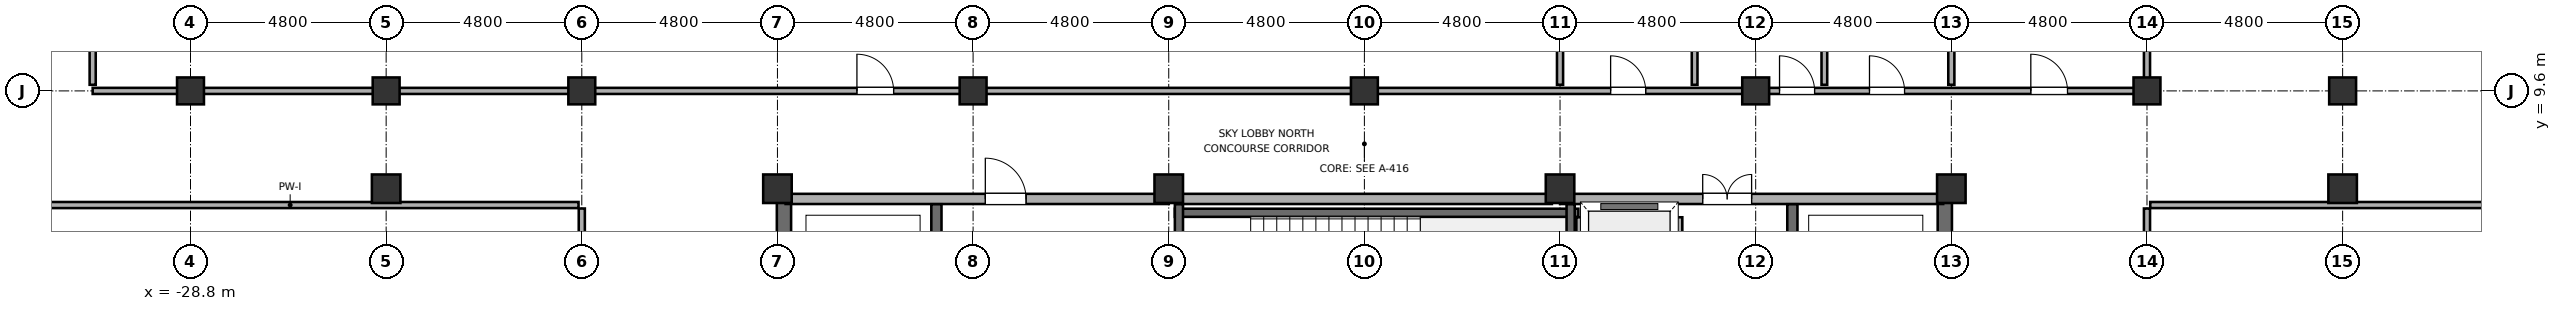
"""IFC4 building model, lengths in metres.
Left out: names, types, materials, properties, quantities, classifications, styles, units other than length and angle.
Written with IfcOpenShell. Run it as: python <this file> out.ifc"""

import sys

from ifc_helpers import new_model, si_unit, direction, frame, frame_2d, origin, origin_2d, place, context, subcontext, project, spatial, rectangle, hollow_rectangle, hollow_circle, extrude, element, fill, save


model = new_model("IFC4")
c1 = context("Model", 3, precision=1e-05, world=origin(), true_north=direction((0.0, 1.0)))
c2 = subcontext(c1, "Body", "Model", "MODEL_VIEW")
j1 = project(units=[si_unit("LENGTHUNIT", "METRE"), si_unit("PLANEANGLEUNIT", "RADIAN")], contexts=[c1])
p1 = place(None, origin())
s1 = spatial("IfcSite", under=j1, at=p1, CompositionType="ELEMENT")
p2 = place(p1, origin())
s2 = spatial("IfcBuilding", under=s1, at=p2, CompositionType="ELEMENT")
p3 = place(p2, frame((0.0, 0.0, 180.3)))
s3 = spatial("IfcBuildingStorey", under=s2, at=p3, CompositionType="ELEMENT", Elevation=180.3)
p4 = place(p3, frame((-28.8, 9.6, 0.0), z_axis=(0.0, 0.0, 1.0), x_axis=(1.0, 0.0, 0.0)))
e1 = element("IfcColumn", 1, at=p4, inside=s3, PredefinedType="COLUMN", context=c2, shape_type="SweptSolid", body=[
    extrude(hollow_circle(Radius=0.33, WallThickness=0.028, at=origin_2d()), origin(), (0.0, 0.0, 1.0), 5.2),
])
p5 = place(p3, frame((-24.0, 7.2, 0.0), z_axis=(0.0, 0.0, 1.0), x_axis=(1.0, 0.0, 0.0)))
e2 = element("IfcColumn", 2, at=p5, inside=s3, PredefinedType="COLUMN", context=c2, shape_type="SweptSolid", body=[
    extrude(hollow_rectangle(XDim=0.7, YDim=0.7, WallThickness=0.032, at=origin_2d()), origin(), (0.0, 0.0, 1.0), 5.2),
])
for number, where, z_axis, x_axis in (
    (3, (-24.0, 9.6, 0.0), (0.0, 0.0, 1.0), (1.0, 0.0, 0.0)),
    (4, (-19.2, 9.6, 0.0), (0.0, 0.0, 1.0), (1.0, 0.0, 0.0)),
):
    element("IfcColumn", number, at=place(p3, frame(where, z_axis=z_axis, x_axis=x_axis)), inside=s3, PredefinedType="COLUMN", context=c2, shape_type="SweptSolid", body=[
        extrude(hollow_circle(Radius=0.33, WallThickness=0.028, at=origin_2d()), origin(), (0.0, 0.0, 1.0), 5.2),
    ])
p6 = place(p3, frame((-14.4, 7.2, 0.0), z_axis=(0.0, 0.0, 1.0), x_axis=(1.0, 0.0, 0.0)))
e5 = element("IfcColumn", 5, at=p6, inside=s3, PredefinedType="COLUMN", context=c2, shape_type="SweptSolid", body=[
    extrude(hollow_rectangle(XDim=0.7, YDim=0.7, WallThickness=0.032, at=origin_2d()), origin(), (0.0, 0.0, 1.0), 5.2),
])
p7 = place(p3, frame((-9.6, 9.6, 0.0), z_axis=(0.0, 0.0, 1.0), x_axis=(1.0, 0.0, 0.0)))
e6 = element("IfcColumn", 6, at=p7, inside=s3, PredefinedType="COLUMN", context=c2, shape_type="SweptSolid", body=[
    extrude(hollow_circle(Radius=0.33, WallThickness=0.028, at=origin_2d()), origin(), (0.0, 0.0, 1.0), 5.2),
])
p8 = place(p3, frame((-4.8, 7.2, 0.0), z_axis=(0.0, 0.0, 1.0), x_axis=(1.0, 0.0, 0.0)))
e7 = element("IfcColumn", 7, at=p8, inside=s3, PredefinedType="COLUMN", context=c2, shape_type="SweptSolid", body=[
    extrude(hollow_rectangle(XDim=0.7, YDim=0.7, WallThickness=0.032, at=origin_2d()), origin(), (0.0, 0.0, 1.0), 5.2),
])
p9 = place(p3, frame((0.0, 9.6, 0.0), z_axis=(0.0, 0.0, 1.0), x_axis=(1.0, 0.0, 0.0)))
e8 = element("IfcColumn", 8, at=p9, inside=s3, PredefinedType="COLUMN", context=c2, shape_type="SweptSolid", body=[
    extrude(hollow_circle(Radius=0.33, WallThickness=0.028, at=origin_2d()), origin(), (0.0, 0.0, 1.0), 5.2),
])
p10 = place(p3, frame((4.8, 7.2, 0.0), z_axis=(0.0, 0.0, 1.0), x_axis=(1.0, 0.0, 0.0)))
e9 = element("IfcColumn", 9, at=p10, inside=s3, PredefinedType="COLUMN", context=c2, shape_type="SweptSolid", body=[
    extrude(hollow_rectangle(XDim=0.7, YDim=0.7, WallThickness=0.032, at=origin_2d()), origin(), (0.0, 0.0, 1.0), 5.2),
])
p11 = place(p3, frame((9.6, 9.6, 0.0), z_axis=(0.0, 0.0, 1.0), x_axis=(1.0, 0.0, 0.0)))
e10 = element("IfcColumn", 10, at=p11, inside=s3, PredefinedType="COLUMN", context=c2, shape_type="SweptSolid", body=[
    extrude(hollow_circle(Radius=0.33, WallThickness=0.028, at=origin_2d()), origin(), (0.0, 0.0, 1.0), 5.2),
])
p12 = place(p3, frame((14.4, 7.2, 0.0), z_axis=(0.0, 0.0, 1.0), x_axis=(1.0, 0.0, 0.0)))
e11 = element("IfcColumn", 11, at=p12, inside=s3, PredefinedType="COLUMN", context=c2, shape_type="SweptSolid", body=[
    extrude(hollow_rectangle(XDim=0.7, YDim=0.7, WallThickness=0.032, at=origin_2d()), origin(), (0.0, 0.0, 1.0), 5.2),
])
p13 = place(p3, frame((19.2, 9.6, 0.0), z_axis=(0.0, 0.0, 1.0), x_axis=(1.0, 0.0, 0.0)))
e12 = element("IfcColumn", 12, at=p13, inside=s3, PredefinedType="COLUMN", context=c2, shape_type="SweptSolid", body=[
    extrude(hollow_circle(Radius=0.33, WallThickness=0.028, at=origin_2d()), origin(), (0.0, 0.0, 1.0), 5.2),
])
p14 = place(p3, frame((24.0, 7.2, 0.0), z_axis=(0.0, 0.0, 1.0), x_axis=(1.0, 0.0, 0.0)))
e13 = element("IfcColumn", 13, at=p14, inside=s3, PredefinedType="COLUMN", context=c2, shape_type="SweptSolid", body=[
    extrude(hollow_rectangle(XDim=0.7, YDim=0.7, WallThickness=0.032, at=origin_2d()), origin(), (0.0, 0.0, 1.0), 5.2),
])
p15 = place(p3, frame((24.0, 9.6, 0.0), z_axis=(0.0, 0.0, 1.0), x_axis=(1.0, 0.0, 0.0)))
e14 = element("IfcColumn", 14, at=p15, inside=s3, PredefinedType="COLUMN", context=c2, shape_type="SweptSolid", body=[
    extrude(hollow_circle(Radius=0.33, WallThickness=0.028, at=origin_2d()), origin(), (0.0, 0.0, 1.0), 5.2),
])
for number, where, z_axis, x_axis in (
    (15, (-14.24, -7.2, -0.22), (0.0, 0.0, 1.0), (0.0, 1.0, 0.0)),
    (16, (14.24, -7.2, -0.22), (0.0, 0.0, 1.0), (0.0, 1.0, 0.0)),
):
    element("IfcWall", number, at=place(p3, frame(where, z_axis=z_axis, x_axis=x_axis)), inside=s3, PredefinedType="SHEAR", context=c2, shape_type="SweptSolid", body=[
        extrude(rectangle(XDim=14.4, YDim=0.35, at=frame_2d((7.2, 0.0))), origin(), (0.0, 0.0, 1.0), 5.17),
    ])
p16 = place(p3, frame((-14.2, 6.95, 0.0), z_axis=(0.0, 0.0, 1.0), x_axis=(1.0, 0.0, 0.0)))
e17 = element("IfcWall", 17, at=p16, inside=s3, PredefinedType="SOLIDWALL", context=c2, shape_type="SweptSolid", body=[
    extrude(rectangle(XDim=9.4, YDim=0.25, at=frame_2d((4.7, 0.0))), origin(), (0.0, 0.0, 1.0), 3.55),
])
p17 = place(p16, frame((4.9, 0.0, 0.0)))
e18 = element("IfcOpeningElement", 18, at=p17, cuts=e17, PredefinedType="OPENING", context=c2, shape_type="SweptSolid", body=[
    extrude(rectangle(XDim=1.0, YDim=2.15, at=frame_2d((0.5, 1.075))), frame((0.0, 0.14, 0.0), z_axis=(0.0, -1.0, 0.0), x_axis=(1.0, 0.0, 0.0)), (0.0, 0.0, 1.0), 0.28),
])
p18 = place(p3, frame((-4.6, 6.95, 0.0), z_axis=(0.0, 0.0, 1.0), x_axis=(1.0, 0.0, 0.0)))
e19 = element("IfcWall", 19, at=p18, inside=s3, PredefinedType="SOLIDWALL", context=c2, shape_type="SweptSolid", body=[
    extrude(rectangle(XDim=9.2, YDim=0.25, at=frame_2d((4.6, 0.0))), origin(), (0.0, 0.0, 1.0), 3.55),
])
p19 = place(p3, frame((4.8, 6.95, 0.0), z_axis=(0.0, 0.0, 1.0), x_axis=(1.0, 0.0, 0.0)))
e20 = element("IfcWall", 20, at=p19, inside=s3, PredefinedType="SOLIDWALL", context=c2, shape_type="SweptSolid", body=[
    extrude(rectangle(XDim=9.4, YDim=0.25, at=frame_2d((4.7, 0.0))), origin(), (0.0, 0.0, 1.0), 3.55),
])
p20 = place(p19, frame((3.5, 0.0, 0.0)))
e21 = element("IfcOpeningElement", 21, at=p20, cuts=e20, PredefinedType="OPENING", context=c2, shape_type="SweptSolid", body=[
    extrude(rectangle(XDim=1.2, YDim=2.2, at=frame_2d((0.6, 1.1))), frame((0.0, 0.14, 0.0), z_axis=(0.0, -1.0, 0.0), x_axis=(1.0, 0.0, 0.0)), (0.0, 0.0, 1.0), 0.28),
])
p21 = place(p3, frame((-10.5, -6.82, -0.22), z_axis=(0.0, 0.0, 1.0), x_axis=(0.0, 1.0, 0.0)))
e22 = element("IfcWall", 22, at=p21, inside=s3, PredefinedType="SOLIDWALL", context=c2, shape_type="SweptSolid", body=[
    extrude(rectangle(XDim=13.64, YDim=0.25, at=frame_2d((6.82, 0.0))), origin(), (0.0, 0.0, 1.0), 5.17),
])
p22 = place(p21, frame((2.32, 0.0, 0.22)))
e23 = element("IfcOpeningElement", 23, at=p22, cuts=e22, PredefinedType="OPENING", context=c2, shape_type="SweptSolid", body=[
    extrude(rectangle(XDim=0.95, YDim=2.15, at=frame_2d((0.475, 1.075))), frame((0.0, 0.14, 0.0), z_axis=(0.0, -1.0, 0.0), x_axis=(1.0, 0.0, 0.0)), (0.0, 0.0, 1.0), 0.28),
])
p23 = place(p3, frame((10.5, -6.82, -0.22), z_axis=(0.0, 0.0, 1.0), x_axis=(0.0, 1.0, 0.0)))
e24 = element("IfcWall", 24, at=p23, inside=s3, PredefinedType="SOLIDWALL", context=c2, shape_type="SweptSolid", body=[
    extrude(rectangle(XDim=13.64, YDim=0.25, at=frame_2d((6.82, 0.0))), origin(), (0.0, 0.0, 1.0), 5.17),
])
p24 = place(p23, frame((2.32, 0.0, 0.22)))
e25 = element("IfcOpeningElement", 25, at=p24, cuts=e24, PredefinedType="OPENING", context=c2, shape_type="SweptSolid", body=[
    extrude(rectangle(XDim=0.95, YDim=2.15, at=frame_2d((0.475, 1.075))), frame((0.0, 0.14, 0.0), z_axis=(0.0, -1.0, 0.0), x_axis=(1.0, 0.0, 0.0)), (0.0, 0.0, 1.0), 0.28),
])
p25 = place(p3, frame((-4.65, 6.61, -0.22), z_axis=(0.0, 0.0, 1.0), x_axis=(1.0, 0.0, 0.0)))
e26 = element("IfcWall", 26, at=p25, inside=s3, PredefinedType="SOLIDWALL", context=c2, shape_type="SweptSolid", body=[
    extrude(rectangle(XDim=9.9, YDim=0.2, at=frame_2d((4.95, 0.0))), origin(), (0.0, 0.0, 1.0), 5.17),
])
for number, where, z_axis, x_axis in (
    (27, (-4.55, 3.08, -0.22), (0.0, 0.0, 1.0), (0.0, 1.0, 0.0)),
    (28, (5.06, 3.08, -0.22), (0.0, 0.0, 1.0), (0.0, 1.0, 0.0)),
):
    element("IfcWall", number, at=place(p3, frame(where, z_axis=z_axis, x_axis=x_axis)), inside=s3, PredefinedType="SOLIDWALL", context=c2, shape_type="SweptSolid", body=[
        extrude(rectangle(XDim=3.74, YDim=0.2, at=frame_2d((1.87, 0.0))), origin(), (0.0, 0.0, 1.0), 5.17),
    ])
p26 = place(p3, frame((7.7, -0.3, 0.0), z_axis=(0.0, 0.0, 1.0), x_axis=(0.0, 1.0, 0.0)))
e29 = element("IfcWall", 29, at=p26, inside=s3, PredefinedType="SOLIDWALL", context=c2, shape_type="SweptSolid", body=[
    extrude(rectangle(XDim=6.8, YDim=0.2, at=frame_2d((3.4, 0.0))), origin(), (0.0, 0.0, 1.0), 4.95),
])
p27 = place(p26, frame((0.55, 0.0, 0.0)))
e30 = element("IfcOpeningElement", 30, at=p27, cuts=e29, PredefinedType="OPENING", context=c2, shape_type="SweptSolid", body=[
    extrude(rectangle(XDim=1.1, YDim=2.2, at=frame_2d((0.55, 1.1))), frame((0.0, 0.115, 0.0), z_axis=(0.0, -1.0, 0.0), x_axis=(1.0, 0.0, 0.0)), (0.0, 0.0, 1.0), 0.23),
])
p28 = place(p26, frame((2.9, 0.0, 0.0)))
e31 = element("IfcOpeningElement", 31, at=p28, cuts=e29, PredefinedType="OPENING", context=c2, shape_type="SweptSolid", body=[
    extrude(rectangle(XDim=1.1, YDim=2.2, at=frame_2d((0.55, 1.1))), frame((0.0, 0.115, 0.0), z_axis=(0.0, -1.0, 0.0), x_axis=(1.0, 0.0, 0.0)), (0.0, 0.0, 1.0), 0.23),
])
p29 = place(p26, frame((5.2, 0.0, 0.0)))
e32 = element("IfcOpeningElement", 32, at=p29, cuts=e29, PredefinedType="OPENING", context=c2, shape_type="SweptSolid", body=[
    extrude(rectangle(XDim=1.1, YDim=2.2, at=frame_2d((0.55, 1.1))), frame((0.0, 0.115, 0.0), z_axis=(0.0, -1.0, 0.0), x_axis=(1.0, 0.0, 0.0)), (0.0, 0.0, 1.0), 0.23),
])
p30 = place(p3, frame((5.3, -0.3, 0.0), z_axis=(0.0, 0.0, 1.0), x_axis=(0.0, 1.0, 0.0)))
e33 = element("IfcWall", 33, at=p30, inside=s3, PredefinedType="SOLIDWALL", context=c2, shape_type="SweptSolid", body=[
    extrude(rectangle(XDim=6.8, YDim=0.2, at=frame_2d((3.4, 0.0))), origin(), (0.0, 0.0, 1.0), 4.95),
])
p31 = place(p3, frame((5.44, 6.5, 0.0), z_axis=(0.0, 0.0, 1.0), x_axis=(1.0, 0.0, 0.0)))
e34 = element("IfcWall", 34, at=p31, inside=s3, PredefinedType="PARTITIONING", context=c2, shape_type="SweptSolid", body=[
    extrude(rectangle(XDim=2.12, YDim=0.12, at=frame_2d((1.06, 0.0))), origin(), (0.0, 0.0, 1.0), 4.95),
])
p32 = place(p3, frame((-33.43, 6.8, 0.0), z_axis=(0.0, 0.0, 1.0), x_axis=(1.0, 0.0, 0.0)))
e35 = element("IfcWall", 35, at=p32, inside=s3, PredefinedType="PARTITIONING", context=c2, shape_type="SweptSolid", body=[
    extrude(rectangle(XDim=14.15, YDim=0.15, at=frame_2d((7.075, 0.0))), origin(), (0.0, 0.0, 1.0), 3.55),
])
p33 = place(p3, frame((19.28, 6.8, 0.0), z_axis=(0.0, 0.0, 1.0), x_axis=(1.0, 0.0, 0.0)))
e36 = element("IfcWall", 36, at=p33, inside=s3, PredefinedType="PARTITIONING", context=c2, shape_type="SweptSolid", body=[
    extrude(rectangle(XDim=9.35, YDim=0.15, at=frame_2d((4.675, 0.0))), origin(), (0.0, 0.0, 1.0), 3.55),
])
p34 = place(p3, frame((-31.2, 9.6, 0.0), z_axis=(0.0, 0.0, 1.0), x_axis=(1.0, 0.0, 0.0)))
e37 = element("IfcWall", 37, at=p34, inside=s3, PredefinedType="PARTITIONING", context=c2, shape_type="SweptSolid", body=[
    extrude(rectangle(XDim=50.28, YDim=0.15, at=frame_2d((25.14, 0.0))), origin(), (0.0, 0.0, 1.0), 3.55),
])
p35 = place(p34, frame((18.75, 0.0, 0.0)))
e38 = element("IfcOpeningElement", 38, at=p35, cuts=e37, PredefinedType="OPENING", context=c2, shape_type="SweptSolid", body=[
    extrude(rectangle(XDim=0.9, YDim=2.1, at=frame_2d((0.45, 1.05))), frame((0.0, 0.09, 0.0), z_axis=(0.0, -1.0, 0.0), x_axis=(1.0, 0.0, 0.0)), (0.0, 0.0, 1.0), 0.18),
])
p36 = place(p34, frame((37.241, 0.0, 0.0)))
e39 = element("IfcOpeningElement", 39, at=p36, cuts=e37, PredefinedType="OPENING", context=c2, shape_type="SweptSolid", body=[
    extrude(rectangle(XDim=0.86, YDim=2.1, at=frame_2d((0.43, 1.05))), frame((0.0, 0.09, 0.0), z_axis=(0.0, -1.0, 0.0), x_axis=(1.0, 0.0, 0.0)), (0.0, 0.0, 1.0), 0.18),
])
p37 = place(p34, frame((41.385, 0.0, 0.0)))
e40 = element("IfcOpeningElement", 40, at=p37, cuts=e37, PredefinedType="OPENING", context=c2, shape_type="SweptSolid", body=[
    extrude(rectangle(XDim=0.86, YDim=2.1, at=frame_2d((0.43, 1.05))), frame((0.0, 0.09, 0.0), z_axis=(0.0, -1.0, 0.0), x_axis=(1.0, 0.0, 0.0)), (0.0, 0.0, 1.0), 0.18),
])
p38 = place(p34, frame((43.592, 0.0, 0.0)))
e41 = element("IfcOpeningElement", 41, at=p38, cuts=e37, PredefinedType="OPENING", context=c2, shape_type="SweptSolid", body=[
    extrude(rectangle(XDim=0.86, YDim=2.1, at=frame_2d((0.43, 1.05))), frame((0.0, 0.09, 0.0), z_axis=(0.0, -1.0, 0.0), x_axis=(1.0, 0.0, 0.0)), (0.0, 0.0, 1.0), 0.18),
])
p39 = place(p34, frame((47.55, 0.0, 0.0)))
e42 = element("IfcOpeningElement", 42, at=p39, cuts=e37, PredefinedType="OPENING", context=c2, shape_type="SweptSolid", body=[
    extrude(rectangle(XDim=0.9, YDim=2.1, at=frame_2d((0.45, 1.05))), frame((0.0, 0.09, 0.0), z_axis=(0.0, -1.0, 0.0), x_axis=(1.0, 0.0, 0.0)), (0.0, 0.0, 1.0), 0.18),
])
p40 = place(p3, frame((-31.2, 9.75, 0.0), z_axis=(0.0, 0.0, 1.0), x_axis=(0.0, 1.0, 0.0)))
e43 = element("IfcWall", 43, at=p40, inside=s3, PredefinedType="PARTITIONING", context=c2, shape_type="SweptSolid", body=[
    extrude(rectangle(XDim=8.689, YDim=0.15, at=frame_2d((4.344, 0.0))), origin(), (0.0, 0.0, 1.0), 3.55),
])
p41 = place(p3, frame((-19.2, -6.715, 0.0), z_axis=(0.0, 0.0, 1.0), x_axis=(0.0, 1.0, 0.0)))
e44 = element("IfcWall", 44, at=p41, inside=s3, PredefinedType="PARTITIONING", context=c2, shape_type="SweptSolid", body=[
    extrude(rectangle(XDim=13.43, YDim=0.15, at=frame_2d((6.715, 0.0))), origin(), (0.0, 0.0, 1.0), 3.55),
])
p42 = place(p41, frame((8.413, 0.0, 0.0)))
e45 = element("IfcOpeningElement", 45, at=p42, cuts=e44, PredefinedType="OPENING", context=c2, shape_type="SweptSolid", body=[
    extrude(rectangle(XDim=0.9, YDim=2.1, at=frame_2d((0.45, 1.05))), frame((0.0, 0.09, 0.0), z_axis=(0.0, -1.0, 0.0), x_axis=(1.0, 0.0, 0.0)), (0.0, 0.0, 1.0), 0.18),
])
p43 = place(p3, frame((4.8, 9.75, 0.0), z_axis=(0.0, 0.0, 1.0), x_axis=(0.0, 1.0, 0.0)))
e46 = element("IfcWall", 46, at=p43, inside=s3, PredefinedType="PARTITIONING", context=c2, shape_type="SweptSolid", body=[
    extrude(rectangle(XDim=9.16, YDim=0.15, at=frame_2d((4.58, 0.0))), origin(), (0.0, 0.0, 1.0), 3.55),
])
for number, where, z_axis, x_axis in (
    (47, (8.102, 9.75, 0.0), (0.0, 0.0, 1.0), (0.0, 1.0, 0.0)),
    (48, (11.285, 9.75, 0.0), (0.0, 0.0, 1.0), (0.0, 1.0, 0.0)),
):
    element("IfcWall", number, at=place(p3, frame(where, z_axis=z_axis, x_axis=x_axis)), inside=s3, PredefinedType="PLUMBINGWALL", context=c2, shape_type="SweptSolid", body=[
        extrude(rectangle(XDim=4.53, YDim=0.14, at=frame_2d((2.265, 0.0))), origin(), (0.0, 0.0, 1.0), 3.55),
    ])
p44 = place(p3, frame((14.4, 9.75, 0.0), z_axis=(0.0, 0.0, 1.0), x_axis=(0.0, 1.0, 0.0)))
e49 = element("IfcWall", 49, at=p44, inside=s3, PredefinedType="PARTITIONING", context=c2, shape_type="SweptSolid", body=[
    extrude(rectangle(XDim=4.53, YDim=0.15, at=frame_2d((2.265, 0.0))), origin(), (0.0, 0.0, 1.0), 3.55),
])
p45 = place(p3, frame((19.2, -6.715, 0.0), z_axis=(0.0, 0.0, 1.0), x_axis=(0.0, 1.0, 0.0)))
e50 = element("IfcWall", 50, at=p45, inside=s3, PredefinedType="PARTITIONING", context=c2, shape_type="SweptSolid", body=[
    extrude(rectangle(XDim=13.43, YDim=0.15, at=frame_2d((6.715, 0.0))), origin(), (0.0, 0.0, 1.0), 3.55),
])
p46 = place(p45, frame((8.413, 0.0, 0.0)))
e51 = element("IfcOpeningElement", 51, at=p46, cuts=e50, PredefinedType="OPENING", context=c2, shape_type="SweptSolid", body=[
    extrude(rectangle(XDim=0.9, YDim=2.1, at=frame_2d((0.45, 1.05))), frame((0.0, 0.09, 0.0), z_axis=(0.0, -1.0, 0.0), x_axis=(1.0, 0.0, 0.0)), (0.0, 0.0, 1.0), 0.18),
])
p47 = place(p3, frame((19.2, 9.75, 0.0), z_axis=(0.0, 0.0, 1.0), x_axis=(0.0, 1.0, 0.0)))
e52 = element("IfcWall", 52, at=p47, inside=s3, PredefinedType="PARTITIONING", context=c2, shape_type="SweptSolid", body=[
    extrude(rectangle(XDim=4.53, YDim=0.15, at=frame_2d((2.265, 0.0))), origin(), (0.0, 0.0, 1.0), 3.55),
])
p48 = place(p17, origin())
e53 = element("IfcDoor", 53, at=p48, inside=s3, OperationType="SINGLE_SWING_RIGHT", PredefinedType="DOOR", context=c2, shape_type="SweptSolid", body=[
    extrude(rectangle(XDim=1.0, YDim=2.15, at=frame_2d((0.5, 1.075))), frame((0.0, 0.025, 0.0), z_axis=(0.0, -1.0, 0.0), x_axis=(1.0, 0.0, 0.0)), (0.0, 0.0, 1.0), 0.05),
])
fill(e18, e53)
p49 = place(p20, origin())
e54 = element("IfcDoor", 54, at=p49, inside=s3, OperationType="DOUBLE_DOOR_SINGLE_SWING", PredefinedType="DOOR", context=c2, shape_type="SweptSolid", body=[
    extrude(rectangle(XDim=1.2, YDim=2.2, at=frame_2d((0.6, 1.1))), frame((0.0, 0.025, 0.0), z_axis=(0.0, -1.0, 0.0), x_axis=(1.0, 0.0, 0.0)), (0.0, 0.0, 1.0), 0.05),
])
fill(e21, e54)
p50 = place(p35, origin())
e55 = element("IfcDoor", 55, at=p50, inside=s3, OperationType="SINGLE_SWING_RIGHT", PredefinedType="DOOR", context=c2, shape_type="SweptSolid", body=[
    extrude(rectangle(XDim=0.9, YDim=2.1, at=frame_2d((0.45, 1.05))), frame((0.0, 0.025, 0.0), z_axis=(0.0, -1.0, 0.0), x_axis=(1.0, 0.0, 0.0)), (0.0, 0.0, 1.0), 0.05),
])
fill(e38, e55)
p51 = place(p36, origin())
e56 = element("IfcDoor", 56, at=p51, inside=s3, OperationType="SINGLE_SWING_LEFT", PredefinedType="DOOR", context=c2, shape_type="SweptSolid", body=[
    extrude(rectangle(XDim=0.86, YDim=2.1, at=frame_2d((0.43, 1.05))), frame((0.0, 0.025, 0.0), z_axis=(0.0, -1.0, 0.0), x_axis=(1.0, 0.0, 0.0)), (0.0, 0.0, 1.0), 0.05),
])
fill(e39, e56)
p52 = place(p37, origin())
e57 = element("IfcDoor", 57, at=p52, inside=s3, OperationType="SINGLE_SWING_RIGHT", PredefinedType="DOOR", context=c2, shape_type="SweptSolid", body=[
    extrude(rectangle(XDim=0.86, YDim=2.1, at=frame_2d((0.43, 1.05))), frame((0.0, 0.025, 0.0), z_axis=(0.0, -1.0, 0.0), x_axis=(1.0, 0.0, 0.0)), (0.0, 0.0, 1.0), 0.05),
])
fill(e40, e57)
p53 = place(p38, origin())
e58 = element("IfcDoor", 58, at=p53, inside=s3, OperationType="SINGLE_SWING_RIGHT", PredefinedType="DOOR", context=c2, shape_type="SweptSolid", body=[
    extrude(rectangle(XDim=0.86, YDim=2.1, at=frame_2d((0.43, 1.05))), frame((0.0, 0.025, 0.0), z_axis=(0.0, -1.0, 0.0), x_axis=(1.0, 0.0, 0.0)), (0.0, 0.0, 1.0), 0.05),
])
fill(e41, e58)
p54 = place(p39, origin())
e59 = element("IfcDoor", 59, at=p54, inside=s3, OperationType="SINGLE_SWING_LEFT", PredefinedType="DOOR", context=c2, shape_type="SweptSolid", body=[
    extrude(rectangle(XDim=0.9, YDim=2.1, at=frame_2d((0.45, 1.05))), frame((0.0, 0.025, 0.0), z_axis=(0.0, -1.0, 0.0), x_axis=(1.0, 0.0, 0.0)), (0.0, 0.0, 1.0), 0.05),
])
fill(e42, e59)
save(model, sys.argv[1])
